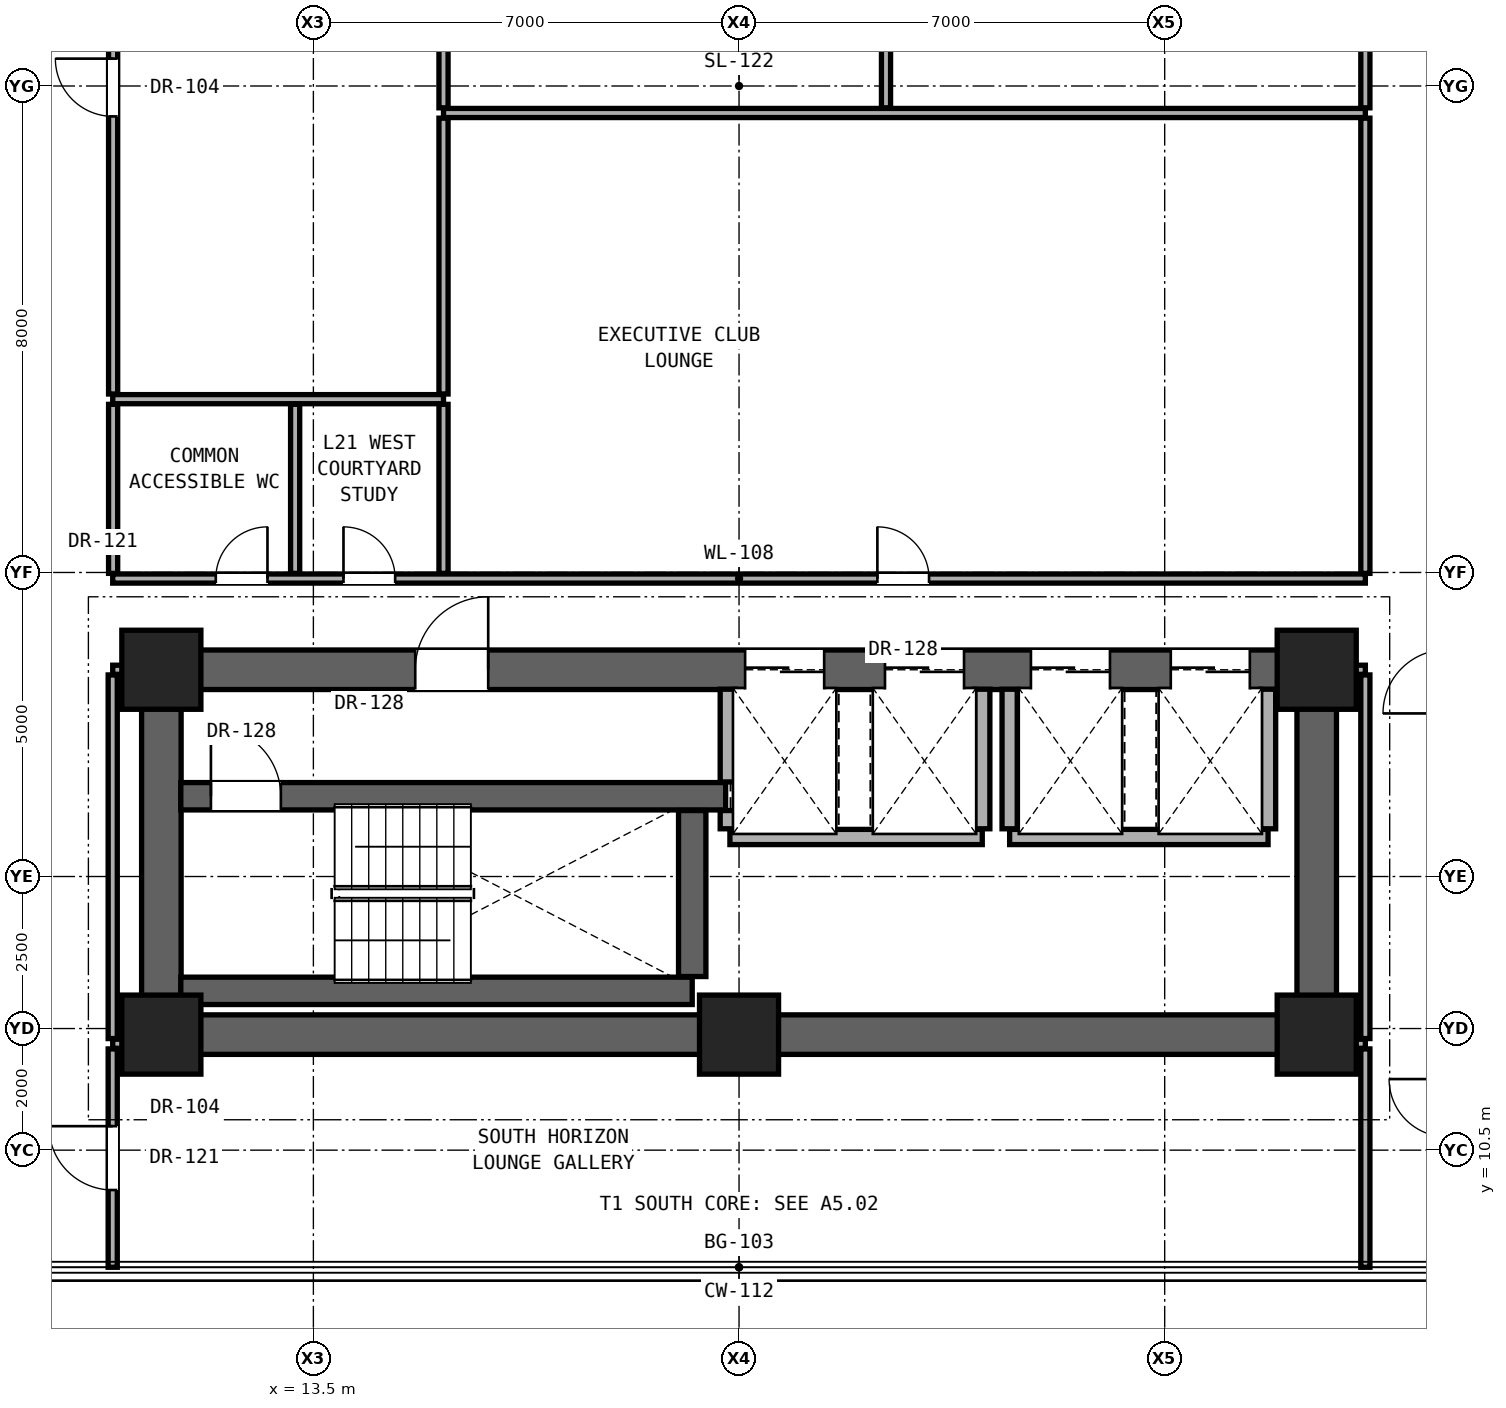
"""IFC4 building model, lengths in metres.
Left out: names, types, materials, properties, quantities, classifications, styles, units other than length and angle.
Written with IfcOpenShell. Run it as: python <this file> out.ifc"""

import sys

from ifc_helpers import new_model, si_unit, direction, frame, frame_2d, origin, origin_2d, place, context, subcontext, project, spatial, rectangle, extrude, element, fill, save


model = new_model("IFC4")
c1 = context("Model", 3, precision=1e-05, world=origin(), true_north=direction((0.0, 1.0)))
c2 = subcontext(c1, "Body", "Model", "MODEL_VIEW")
j1 = project(units=[si_unit("LENGTHUNIT", "METRE"), si_unit("PLANEANGLEUNIT", "RADIAN")], contexts=[c1])
p1 = place(None, origin())
s1 = spatial("IfcSite", under=j1, at=p1, CompositionType="ELEMENT")
p2 = place(p1, origin())
s2 = spatial("IfcBuilding", under=s1, at=p2, CompositionType="ELEMENT")
p3 = place(p2, frame((0.0, 0.0, 75.2)))
s3 = spatial("IfcBuildingStorey", under=s2, at=p3, CompositionType="ELEMENT", Elevation=75.2)
for number, where, z_axis, x_axis in (
    (1, (11.0, 12.4, 0.0), (0.0, 0.0, 1.0), (1.0, 0.0, 0.0)),
    (2, (20.5, 12.4, 0.0), (0.0, 0.0, 1.0), (1.0, 0.0, 0.0)),
    (3, (30.0, 12.4, 0.0), (0.0, 0.0, 1.0), (1.0, 0.0, 0.0)),
    (4, (11.0, 18.4, 0.0), (0.0, 0.0, 1.0), (1.0, 0.0, 0.0)),
    (5, (30.0, 18.4, 0.0), (0.0, 0.0, 1.0), (1.0, 0.0, 0.0)),
):
    element("IfcColumn", number, at=place(p3, frame(where, z_axis=z_axis, x_axis=x_axis)), inside=s3, PredefinedType="COLUMN", context=c2, shape_type="SweptSolid", body=[
        extrude(rectangle(XDim=1.3, YDim=1.3, at=origin_2d()), origin(), (0.0, 0.0, 1.0), 3.3),
    ])
p4 = place(p3, frame((11.0, 12.4, 0.0), z_axis=(0.0, 0.0, 1.0), x_axis=(1.0, 0.0, 0.0)))
e6 = element("IfcWall", 6, at=p4, inside=s3, PredefinedType="SHEAR", context=c2, shape_type="SweptSolid", body=[
    extrude(rectangle(XDim=19.0, YDim=0.65, at=frame_2d((9.5, 0.0))), origin(), (0.0, 0.0, 1.0), 3.06),
])
for number, where, z_axis, x_axis in (
    (7, (11.0, 12.4, 0.0), (0.0, 0.0, 1.0), (0.0, 1.0, 0.0)),
    (8, (30.0, 12.4, 0.0), (0.0, 0.0, 1.0), (0.0, 1.0, 0.0)),
):
    element("IfcWall", number, at=place(p3, frame(where, z_axis=z_axis, x_axis=x_axis)), inside=s3, PredefinedType="SHEAR", context=c2, shape_type="SweptSolid", body=[
        extrude(rectangle(XDim=6.0, YDim=0.65, at=frame_2d((3.0, 0.0))), origin(), (0.0, 0.0, 1.0), 3.06),
    ])
p5 = place(p3, frame((11.0, 18.4, 0.0), z_axis=(0.0, 0.0, 1.0), x_axis=(1.0, 0.0, 0.0)))
e9 = element("IfcWall", 9, at=p5, inside=s3, PredefinedType="SHEAR", context=c2, shape_type="SweptSolid", body=[
    extrude(rectangle(XDim=19.0, YDim=0.65, at=frame_2d((9.5, 0.0))), origin(), (0.0, 0.0, 1.0), 3.06),
])
p6 = place(p5, frame((4.175, 0.0, 0.0)))
e10 = element("IfcOpeningElement", 10, at=p6, cuts=e9, PredefinedType="OPENING", context=c2, shape_type="SweptSolid", body=[
    extrude(rectangle(XDim=1.2, YDim=2.25, at=frame_2d((0.6, 1.125))), frame((0.0, 0.335, 0.0), z_axis=(0.0, -1.0, 0.0), x_axis=(1.0, 0.0, 0.0)), (0.0, 0.0, 1.0), 0.67),
])
p7 = place(p5, frame((9.6, 0.0, 0.0)))
e11 = element("IfcOpeningElement", 11, at=p7, cuts=e9, PredefinedType="OPENING", context=c2, shape_type="SweptSolid", body=[
    extrude(rectangle(XDim=1.3, YDim=2.3, at=frame_2d((0.65, 1.15))), frame((0.0, 0.335, 0.0), z_axis=(0.0, -1.0, 0.0), x_axis=(1.0, 0.0, 0.0)), (0.0, 0.0, 1.0), 0.67),
])
p8 = place(p5, frame((11.9, 0.0, 0.0)))
e12 = element("IfcOpeningElement", 12, at=p8, cuts=e9, PredefinedType="OPENING", context=c2, shape_type="SweptSolid", body=[
    extrude(rectangle(XDim=1.3, YDim=2.3, at=frame_2d((0.65, 1.15))), frame((0.0, 0.335, 0.0), z_axis=(0.0, -1.0, 0.0), x_axis=(1.0, 0.0, 0.0)), (0.0, 0.0, 1.0), 0.67),
])
p9 = place(p5, frame((14.3, 0.0, 0.0)))
e13 = element("IfcOpeningElement", 13, at=p9, cuts=e9, PredefinedType="OPENING", context=c2, shape_type="SweptSolid", body=[
    extrude(rectangle(XDim=1.3, YDim=2.3, at=frame_2d((0.65, 1.15))), frame((0.0, 0.335, 0.0), z_axis=(0.0, -1.0, 0.0), x_axis=(1.0, 0.0, 0.0)), (0.0, 0.0, 1.0), 0.67),
])
p10 = place(p5, frame((16.6, 0.0, 0.0)))
e14 = element("IfcOpeningElement", 14, at=p10, cuts=e9, PredefinedType="OPENING", context=c2, shape_type="SweptSolid", body=[
    extrude(rectangle(XDim=1.3, YDim=2.3, at=frame_2d((0.65, 1.15))), frame((0.0, 0.335, 0.0), z_axis=(0.0, -1.0, 0.0), x_axis=(1.0, 0.0, 0.0)), (0.0, 0.0, 1.0), 0.67),
])
for number, where, z_axis, x_axis in (
    (15, (10.2, 12.25, 0.0), (0.0, 0.0, 1.0), (1.0, 0.0, 0.0)),
    (16, (30.32, 12.25, 0.0), (0.0, 0.0, 1.0), (1.0, 0.0, 0.0)),
):
    element("IfcWall", number, at=place(p3, frame(where, z_axis=z_axis, x_axis=x_axis)), inside=s3, PredefinedType="PARTITIONING", context=c2, shape_type="SweptSolid", body=[
        extrude(rectangle(XDim=0.48, YDim=0.15, at=frame_2d((0.24, 0.0))), origin(), (0.0, 0.0, 1.0), 3.06),
    ])
p11 = place(p3, frame((11.32, 13.12, 0.0), z_axis=(0.0, 0.0, 1.0), x_axis=(1.0, 0.0, 0.0)))
e17 = element("IfcWall", 17, at=p11, inside=s3, PredefinedType="SHEAR", context=c2, shape_type="SweptSolid", body=[
    extrude(rectangle(XDim=8.41, YDim=0.45, at=frame_2d((4.205, 0.0))), origin(), (0.0, 0.0, 1.0), 3.06),
])
p12 = place(p3, frame((20.35, 15.65, 0.0), z_axis=(0.0, 0.0, 1.0), x_axis=(1.0, 0.0, 0.0)))
e18 = element("IfcWall", 18, at=p12, inside=s3, PredefinedType="SOLIDWALL", context=c2, shape_type="SweptSolid", body=[
    extrude(rectangle(XDim=4.15, YDim=0.25, at=frame_2d((2.075, 0.0))), origin(), (0.0, 0.0, 1.0), 3.06),
])
p13 = place(p3, frame((24.95, 15.65, 0.0), z_axis=(0.0, 0.0, 1.0), x_axis=(1.0, 0.0, 0.0)))
e19 = element("IfcWall", 19, at=p13, inside=s3, PredefinedType="SOLIDWALL", context=c2, shape_type="SweptSolid", body=[
    extrude(rectangle(XDim=4.25, YDim=0.25, at=frame_2d((2.125, 0.0))), origin(), (0.0, 0.0, 1.0), 3.06),
])
p14 = place(p3, frame((11.32, 16.32, 0.0), z_axis=(0.0, 0.0, 1.0), x_axis=(1.0, 0.0, 0.0)))
e20 = element("IfcWall", 20, at=p14, inside=s3, PredefinedType="SHEAR", context=c2, shape_type="SweptSolid", body=[
    extrude(rectangle(XDim=8.96, YDim=0.45, at=frame_2d((4.48, 0.0))), origin(), (0.0, 0.0, 1.0), 3.06),
])
p15 = place(p14, frame((0.495, 0.0, 0.0)))
e21 = element("IfcOpeningElement", 21, at=p15, cuts=e20, PredefinedType="OPENING", context=c2, shape_type="SweptSolid", body=[
    extrude(rectangle(XDim=1.15, YDim=2.2, at=frame_2d((0.575, 1.1))), frame((0.0, 0.235, 0.0), z_axis=(0.0, -1.0, 0.0), x_axis=(1.0, 0.0, 0.0)), (0.0, 0.0, 1.0), 0.47),
])
for number, where, z_axis, x_axis in (
    (22, (10.2, 18.4, 0.0), (0.0, 0.0, 1.0), (1.0, 0.0, 0.0)),
    (23, (30.32, 18.4, 0.0), (0.0, 0.0, 1.0), (1.0, 0.0, 0.0)),
):
    element("IfcWall", number, at=place(p3, frame(where, z_axis=z_axis, x_axis=x_axis)), inside=s3, PredefinedType="PARTITIONING", context=c2, shape_type="SweptSolid", body=[
        extrude(rectangle(XDim=0.48, YDim=0.15, at=frame_2d((0.24, 0.0))), origin(), (0.0, 0.0, 1.0), 2.436),
    ])
p16 = place(p3, frame((10.2, 19.9, 0.0), z_axis=(0.0, 0.0, 1.0), x_axis=(1.0, 0.0, 0.0)))
e24 = element("IfcWall", 24, at=p16, inside=s3, PredefinedType="PARTITIONING", context=c2, shape_type="SweptSolid", body=[
    extrude(rectangle(XDim=20.6, YDim=0.15, at=frame_2d((10.3, 0.0))), origin(), (0.0, 0.0, 1.0), 2.104),
])
p17 = place(p16, frame((1.695, 0.0, 0.0)))
e25 = element("IfcOpeningElement", 25, at=p17, cuts=e24, PredefinedType="OPENING", context=c2, shape_type="SweptSolid", body=[
    extrude(rectangle(XDim=0.85, YDim=2.01, at=frame_2d((0.425, 1.005))), frame((0.0, 0.085, 0.0), z_axis=(0.0, -1.0, 0.0), x_axis=(1.0, 0.0, 0.0)), (0.0, 0.0, 1.0), 0.17),
])
p18 = place(p16, frame((3.795, 0.0, 0.0)))
e26 = element("IfcOpeningElement", 26, at=p18, cuts=e24, PredefinedType="OPENING", context=c2, shape_type="SweptSolid", body=[
    extrude(rectangle(XDim=0.85, YDim=2.01, at=frame_2d((0.425, 1.005))), frame((0.0, 0.085, 0.0), z_axis=(0.0, -1.0, 0.0), x_axis=(1.0, 0.0, 0.0)), (0.0, 0.0, 1.0), 0.17),
])
p19 = place(p16, frame((12.575, 0.0, 0.0)))
e27 = element("IfcOpeningElement", 27, at=p19, cuts=e24, PredefinedType="OPENING", context=c2, shape_type="SweptSolid", body=[
    extrude(rectangle(XDim=0.85, YDim=2.01, at=frame_2d((0.425, 1.005))), frame((0.0, 0.085, 0.0), z_axis=(0.0, -1.0, 0.0), x_axis=(1.0, 0.0, 0.0)), (0.0, 0.0, 1.0), 0.17),
])
p20 = place(p3, frame((10.2, 22.85, 0.0), z_axis=(0.0, 0.0, 1.0), x_axis=(1.0, 0.0, 0.0)))
e28 = element("IfcWall", 28, at=p20, inside=s3, PredefinedType="PARTITIONING", context=c2, shape_type="SweptSolid", body=[
    extrude(rectangle(XDim=5.44, YDim=0.15, at=frame_2d((2.72, 0.0))), origin(), (0.0, 0.0, 1.0), 2.104),
])
p21 = place(p3, frame((15.64, 27.556, 0.0), z_axis=(0.0, 0.0, 1.0), x_axis=(1.0, 0.0, 0.0)))
e29 = element("IfcWall", 29, at=p21, inside=s3, PredefinedType="PARTITIONING", context=c2, shape_type="SweptSolid", body=[
    extrude(rectangle(XDim=15.16, YDim=0.15, at=frame_2d((7.58, 0.0))), origin(), (0.0, 0.0, 1.0), 2.104),
])
p22 = place(p3, frame((10.2, 8.574, 0.0), z_axis=(0.0, 0.0, 1.0), x_axis=(0.0, 1.0, 0.0)))
e30 = element("IfcWall", 30, at=p22, inside=s3, PredefinedType="PARTITIONING", context=c2, shape_type="SweptSolid", body=[
    extrude(rectangle(XDim=3.591, YDim=0.15, at=frame_2d((1.795, 0.0))), origin(), (0.0, 0.0, 1.0), 3.06),
])
p23 = place(p22, frame((1.271, 0.0, 0.0)))
e31 = element("IfcOpeningElement", 31, at=p23, cuts=e30, PredefinedType="OPENING", context=c2, shape_type="SweptSolid", body=[
    extrude(rectangle(XDim=1.05, YDim=2.2, at=frame_2d((0.525, 1.1))), frame((0.0, 0.085, 0.0), z_axis=(0.0, -1.0, 0.0), x_axis=(1.0, 0.0, 0.0)), (0.0, 0.0, 1.0), 0.17),
])
p24 = place(p3, frame((10.2, 12.335, 0.0), z_axis=(0.0, 0.0, 1.0), x_axis=(0.0, 1.0, 0.0)))
e32 = element("IfcWall", 32, at=p24, inside=s3, PredefinedType="PARTITIONING", context=c2, shape_type="SweptSolid", body=[
    extrude(rectangle(XDim=5.98, YDim=0.15, at=frame_2d((2.99, 0.0))), origin(), (0.0, 0.0, 1.0), 2.436),
])
p25 = place(p3, frame((10.207, 19.985, 0.0), z_axis=(0.0, 0.0, 1.0), x_axis=(0.0, 1.0, 0.0)))
e33 = element("IfcWall", 33, at=p25, inside=s3, PredefinedType="PARTITIONING", context=c2, shape_type="SweptSolid", body=[
    extrude(rectangle(XDim=2.78, YDim=0.15, at=frame_2d((1.39, 0.0))), origin(), (0.0, 0.0, 1.0), 3.06),
])
p26 = place(p3, frame((10.207, 22.935, 0.0), z_axis=(0.0, 0.0, 1.0), x_axis=(0.0, 1.0, 0.0)))
e34 = element("IfcWall", 34, at=p26, inside=s3, PredefinedType="PARTITIONING", context=c2, shape_type="SweptSolid", body=[
    extrude(rectangle(XDim=10.08, YDim=0.15, at=frame_2d((5.04, 0.0))), origin(), (0.0, 0.0, 1.0), 2.279),
])
p27 = place(p26, frame((4.565, 0.0, 0.0)))
e35 = element("IfcOpeningElement", 35, at=p27, cuts=e34, PredefinedType="OPENING", context=c2, shape_type="SweptSolid", body=[
    extrude(rectangle(XDim=0.95, YDim=2.15, at=frame_2d((0.475, 1.075))), frame((0.0, 0.085, 0.0), z_axis=(0.0, -1.0, 0.0), x_axis=(1.0, 0.0, 0.0)), (0.0, 0.0, 1.0), 0.17),
])
p28 = place(p3, frame((13.2, 19.985, 0.0), z_axis=(0.0, 0.0, 1.0), x_axis=(0.0, 1.0, 0.0)))
e36 = element("IfcWall", 36, at=p28, inside=s3, PredefinedType="PARTITIONING", context=c2, shape_type="SweptSolid", body=[
    extrude(rectangle(XDim=2.78, YDim=0.15, at=frame_2d((1.39, 0.0))), origin(), (0.0, 0.0, 1.0), 3.06),
])
p29 = place(p3, frame((15.64, 19.985, 0.0), z_axis=(0.0, 0.0, 1.0), x_axis=(0.0, 1.0, 0.0)))
e37 = element("IfcWall", 37, at=p29, inside=s3, PredefinedType="PARTITIONING", context=c2, shape_type="SweptSolid", body=[
    extrude(rectangle(XDim=2.78, YDim=0.15, at=frame_2d((1.39, 0.0))), origin(), (0.0, 0.0, 1.0), 2.589),
])
p30 = place(p3, frame((15.64, 22.935, 0.0), z_axis=(0.0, 0.0, 1.0), x_axis=(0.0, 1.0, 0.0)))
e38 = element("IfcWall", 38, at=p30, inside=s3, PredefinedType="PARTITIONING", context=c2, shape_type="SweptSolid", body=[
    extrude(rectangle(XDim=4.536, YDim=0.15, at=frame_2d((2.268, 0.0))), origin(), (0.0, 0.0, 1.0), 2.104),
])
p31 = place(p3, frame((15.64, 27.641, 0.0), z_axis=(0.0, 0.0, 1.0), x_axis=(0.0, 1.0, 0.0)))
e39 = element("IfcWall", 39, at=p31, inside=s3, PredefinedType="PARTITIONING", context=c2, shape_type="SweptSolid", body=[
    extrude(rectangle(XDim=5.374, YDim=0.15, at=frame_2d((2.687, 0.0))), origin(), (0.0, 0.0, 1.0), 2.104),
])
p32 = place(p3, frame((19.73, 13.355, 0.0), z_axis=(0.0, 0.0, 1.0), x_axis=(0.0, 1.0, 0.0)))
e40 = element("IfcWall", 40, at=p32, inside=s3, PredefinedType="SHEAR", context=c2, shape_type="SweptSolid", body=[
    extrude(rectangle(XDim=2.73, YDim=0.45, at=frame_2d((1.365, 0.0))), origin(), (0.0, 0.0, 1.0), 3.06),
])
p33 = place(p3, frame((20.315, 15.785, 0.0), z_axis=(0.0, 0.0, 1.0), x_axis=(0.0, 1.0, 0.0)))
e41 = element("IfcWall", 41, at=p33, inside=s3, PredefinedType="SOLIDWALL", context=c2, shape_type="SweptSolid", body=[
    extrude(rectangle(XDim=0.3, YDim=0.25, at=frame_2d((0.15, 0.0))), origin(), (0.0, 0.0, 1.0), 3.06),
])
p34 = place(p3, frame((20.315, 16.555, 0.0), z_axis=(0.0, 0.0, 1.0), x_axis=(0.0, 1.0, 0.0)))
e42 = element("IfcWall", 42, at=p34, inside=s3, PredefinedType="SOLIDWALL", context=c2, shape_type="SweptSolid", body=[
    extrude(rectangle(XDim=1.525, YDim=0.25, at=frame_2d((0.763, 0.0))), origin(), (0.0, 0.0, 1.0), 3.06),
])
p35 = place(p3, frame((22.917, 27.641, 0.0), z_axis=(0.0, 0.0, 1.0), x_axis=(0.0, 1.0, 0.0)))
e43 = element("IfcWall", 43, at=p35, inside=s3, PredefinedType="PARTITIONING", context=c2, shape_type="SweptSolid", body=[
    extrude(rectangle(XDim=5.374, YDim=0.15, at=frame_2d((2.687, 0.0))), origin(), (0.0, 0.0, 1.0), 2.104),
])
for number, where, z_axis, x_axis in (
    (44, (24.5, 15.785, 0.0), (0.0, 0.0, 1.0), (0.0, 1.0, 0.0)),
    (45, (24.95, 15.785, 0.0), (0.0, 0.0, 1.0), (0.0, 1.0, 0.0)),
    (46, (29.2, 15.785, 0.0), (0.0, 0.0, 1.0), (0.0, 1.0, 0.0)),
):
    element("IfcWall", number, at=place(p3, frame(where, z_axis=z_axis, x_axis=x_axis)), inside=s3, PredefinedType="SOLIDWALL", context=c2, shape_type="SweptSolid", body=[
        extrude(rectangle(XDim=2.295, YDim=0.25, at=frame_2d((1.147, 0.0))), origin(), (0.0, 0.0, 1.0), 3.06),
    ])
p36 = place(p3, frame((30.8, 8.574, 0.0), z_axis=(0.0, 0.0, 1.0), x_axis=(0.0, 1.0, 0.0)))
e47 = element("IfcWall", 47, at=p36, inside=s3, PredefinedType="PARTITIONING", context=c2, shape_type="SweptSolid", body=[
    extrude(rectangle(XDim=3.591, YDim=0.15, at=frame_2d((1.795, 0.0))), origin(), (0.0, 0.0, 1.0), 3.06),
])
p37 = place(p3, frame((30.8, 12.335, 0.0), z_axis=(0.0, 0.0, 1.0), x_axis=(0.0, 1.0, 0.0)))
e48 = element("IfcWall", 48, at=p37, inside=s3, PredefinedType="PARTITIONING", context=c2, shape_type="SweptSolid", body=[
    extrude(rectangle(XDim=5.98, YDim=0.15, at=frame_2d((2.99, 0.0))), origin(), (0.0, 0.0, 1.0), 2.436),
])
p38 = place(p3, frame((30.8, 19.985, 0.0), z_axis=(0.0, 0.0, 1.0), x_axis=(0.0, 1.0, 0.0)))
e49 = element("IfcWall", 49, at=p38, inside=s3, PredefinedType="PARTITIONING", context=c2, shape_type="SweptSolid", body=[
    extrude(rectangle(XDim=7.486, YDim=0.15, at=frame_2d((3.743, 0.0))), origin(), (0.0, 0.0, 1.0), 2.279),
])
p39 = place(p3, frame((30.8, 27.641, 0.0), z_axis=(0.0, 0.0, 1.0), x_axis=(0.0, 1.0, 0.0)))
e50 = element("IfcWall", 50, at=p39, inside=s3, PredefinedType="PARTITIONING", context=c2, shape_type="SweptSolid", body=[
    extrude(rectangle(XDim=5.374, YDim=0.15, at=frame_2d((2.687, 0.0))), origin(), (0.0, 0.0, 1.0), 2.279),
])
p40 = place(p6, origin())
e51 = element("IfcDoor", 51, at=p40, inside=s3, OperationType="SINGLE_SWING_RIGHT", PredefinedType="DOOR", context=c2, shape_type="SweptSolid", body=[
    extrude(rectangle(XDim=1.2, YDim=2.25, at=frame_2d((0.6, 1.125))), frame((0.0, 0.025, 0.0), z_axis=(0.0, -1.0, 0.0), x_axis=(1.0, 0.0, 0.0)), (0.0, 0.0, 1.0), 0.05),
])
fill(e10, e51)
p41 = place(p15, origin())
e52 = element("IfcDoor", 52, at=p41, inside=s3, OperationType="SINGLE_SWING_LEFT", PredefinedType="DOOR", context=c2, shape_type="SweptSolid", body=[
    extrude(rectangle(XDim=1.15, YDim=2.2, at=frame_2d((0.575, 1.1))), frame((0.0, 0.025, 0.0), z_axis=(0.0, -1.0, 0.0), x_axis=(1.0, 0.0, 0.0)), (0.0, 0.0, 1.0), 0.05),
])
fill(e21, e52)
p42 = place(p17, origin())
e53 = element("IfcDoor", 53, at=p42, inside=s3, OperationType="SINGLE_SWING_RIGHT", PredefinedType="DOOR", context=c2, shape_type="SweptSolid", body=[
    extrude(rectangle(XDim=0.85, YDim=2.01, at=frame_2d((0.425, 1.005))), frame((0.0, 0.025, 0.0), z_axis=(0.0, -1.0, 0.0), x_axis=(1.0, 0.0, 0.0)), (0.0, 0.0, 1.0), 0.05),
])
fill(e25, e53)
p43 = place(p18, origin())
e54 = element("IfcDoor", 54, at=p43, inside=s3, OperationType="SINGLE_SWING_LEFT", PredefinedType="DOOR", context=c2, shape_type="SweptSolid", body=[
    extrude(rectangle(XDim=0.85, YDim=2.01, at=frame_2d((0.425, 1.005))), frame((0.0, 0.025, 0.0), z_axis=(0.0, -1.0, 0.0), x_axis=(1.0, 0.0, 0.0)), (0.0, 0.0, 1.0), 0.05),
])
fill(e26, e54)
p44 = place(p27, origin())
e55 = element("IfcDoor", 55, at=p44, inside=s3, OperationType="SINGLE_SWING_RIGHT", PredefinedType="DOOR", context=c2, shape_type="SweptSolid", body=[
    extrude(rectangle(XDim=0.95, YDim=2.15, at=frame_2d((0.475, 1.075))), frame((0.0, 0.025, 0.0), z_axis=(0.0, -1.0, 0.0), x_axis=(1.0, 0.0, 0.0)), (0.0, 0.0, 1.0), 0.05),
])
fill(e35, e55)
p45 = place(p19, origin())
e56 = element("IfcDoor", 56, at=p45, inside=s3, OperationType="SINGLE_SWING_LEFT", PredefinedType="DOOR", context=c2, shape_type="SweptSolid", body=[
    extrude(rectangle(XDim=0.85, YDim=2.01, at=frame_2d((0.425, 1.005))), frame((0.0, 0.025, 0.0), z_axis=(0.0, -1.0, 0.0), x_axis=(1.0, 0.0, 0.0)), (0.0, 0.0, 1.0), 0.05),
])
fill(e27, e56)
p46 = place(p23, origin())
e57 = element("IfcDoor", 57, at=p46, inside=s3, OperationType="SINGLE_SWING_RIGHT", PredefinedType="DOOR", context=c2, shape_type="SweptSolid", body=[
    extrude(rectangle(XDim=1.05, YDim=2.2, at=frame_2d((0.525, 1.1))), frame((0.0, 0.025, 0.0), z_axis=(0.0, -1.0, 0.0), x_axis=(1.0, 0.0, 0.0)), (0.0, 0.0, 1.0), 0.05),
])
fill(e31, e57)
p47 = place(p7, origin())
e58 = element("IfcDoor", 58, at=p47, inside=s3, OperationType="DOUBLE_DOOR_SLIDING", PredefinedType="DOOR", context=c2, shape_type="SweptSolid", body=[
    extrude(rectangle(XDim=1.3, YDim=2.3, at=frame_2d((0.65, 1.15))), frame((0.0, 0.025, 0.0), z_axis=(0.0, -1.0, 0.0), x_axis=(1.0, 0.0, 0.0)), (0.0, 0.0, 1.0), 0.05),
])
fill(e11, e58)
p48 = place(p8, origin())
e59 = element("IfcDoor", 59, at=p48, inside=s3, OperationType="DOUBLE_DOOR_SLIDING", PredefinedType="DOOR", context=c2, shape_type="SweptSolid", body=[
    extrude(rectangle(XDim=1.3, YDim=2.3, at=frame_2d((0.65, 1.15))), frame((0.0, 0.025, 0.0), z_axis=(0.0, -1.0, 0.0), x_axis=(1.0, 0.0, 0.0)), (0.0, 0.0, 1.0), 0.05),
])
fill(e12, e59)
p49 = place(p9, origin())
e60 = element("IfcDoor", 60, at=p49, inside=s3, OperationType="DOUBLE_DOOR_SLIDING", PredefinedType="DOOR", context=c2, shape_type="SweptSolid", body=[
    extrude(rectangle(XDim=1.3, YDim=2.3, at=frame_2d((0.65, 1.15))), frame((0.0, 0.025, 0.0), z_axis=(0.0, -1.0, 0.0), x_axis=(1.0, 0.0, 0.0)), (0.0, 0.0, 1.0), 0.05),
])
fill(e13, e60)
p50 = place(p10, origin())
e61 = element("IfcDoor", 61, at=p50, inside=s3, OperationType="DOUBLE_DOOR_SLIDING", PredefinedType="DOOR", context=c2, shape_type="SweptSolid", body=[
    extrude(rectangle(XDim=1.3, YDim=2.3, at=frame_2d((0.65, 1.15))), frame((0.0, 0.025, 0.0), z_axis=(0.0, -1.0, 0.0), x_axis=(1.0, 0.0, 0.0)), (0.0, 0.0, 1.0), 0.05),
])
fill(e14, e61)
save(model, sys.argv[1])
